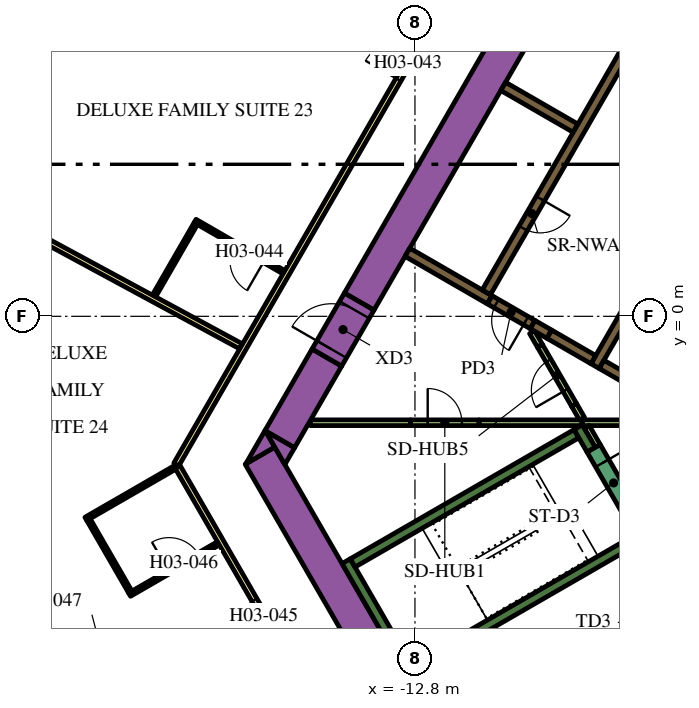
"""IFC4 building model, lengths in metres.
Left out: names, types, materials, properties, quantities, classifications, styles, units other than length and angle.
Written with IfcOpenShell. Run it as: python <this file> out.ifc"""

import sys

from ifc_helpers import new_model, si_unit, direction, frame, frame_2d, origin, place, context, subcontext, project, spatial, polyline, rectangle, outline, extrude, element, fill, save


model = new_model("IFC4")
c1 = context("Model", 3, precision=1e-05, world=origin(), true_north=direction((0.0, 1.0)))
c2 = subcontext(c1, "Body", "Model", "MODEL_VIEW")
j1 = project(units=[si_unit("LENGTHUNIT", "METRE"), si_unit("PLANEANGLEUNIT", "RADIAN")], contexts=[c1])
p1 = place(None, origin())
s1 = spatial("IfcSite", under=j1, at=p1, CompositionType="ELEMENT")
p2 = place(p1, origin())
s2 = spatial("IfcBuilding", under=s1, at=p2, CompositionType="ELEMENT")
p3 = place(p2, frame((0.0, 0.0, 54.9)))
s3 = spatial("IfcBuildingStorey", under=s2, at=p3, CompositionType="ELEMENT", Elevation=54.9)
p4 = place(p3, frame((-14.268, 0.387, 0.0), z_axis=(0.0, 0.0, 1.0), x_axis=(0.499994617707, 0.866028511231, 0.0)))
e1 = element("IfcWall", 1, at=p4, inside=s3, PredefinedType="SOLIDWALL", context=c2, shape_type="SweptSolid", body=[
    extrude(rectangle(XDim=18.817, YDim=0.9, at=frame_2d((9.409, 0.0))), origin(), (0.0, 0.0, 1.0), 3.9),
])
p5 = place(p3, frame((-12.134, -11.883, 0.0), z_axis=(0.0, 0.0, 1.0), x_axis=(-0.500005339912, 0.866022320763, 0.0)))
e2 = element("IfcWall", 2, at=p5, inside=s3, PredefinedType="SOLIDWALL", context=c2, shape_type="SweptSolid", body=[
    extrude(rectangle(XDim=9.488, YDim=0.9, at=frame_2d((4.744, 0.0))), origin(), (0.0, 0.0, 1.0), 3.9),
])
p6 = place(p3, origin())
e3 = element("IfcWall", 3, at=p6, inside=s3, PredefinedType="SOLIDWALL", context=c2, shape_type="SweptSolid", body=[
    extrude(outline(polyline([(-16.489, -3.44), (-17.251, -3.88), (-16.743, -3.0), (-16.489, -3.44)])), origin(), (0.0, 0.0, 1.0), 3.9),
])
p7 = place(p3, frame((-15.118, -1.085, 0.0), z_axis=(0.0, 0.0, 1.0), x_axis=(-0.50006606081, -0.865987260198, 0.0)))
e4 = element("IfcWall", 4, at=p7, inside=s3, PredefinedType="SOLIDWALL", context=c2, shape_type="SweptSolid", body=[
    extrude(rectangle(XDim=2.481, YDim=0.9, at=frame_2d((1.24, 0.0))), origin(), (0.0, 0.0, 1.0), 3.9),
])
e5 = element("IfcWall", 5, at=p6, inside=s3, PredefinedType="SOLIDWALL", context=c2, shape_type="SweptSolid", body=[
    extrude(outline(polyline([(-16.223, -3.9), (-16.732, -3.02), (-15.969, -3.46), (-16.223, -3.9)])), origin(), (0.0, 0.0, 1.0), 3.9),
])
p8 = place(p3, frame((-12.885, -9.431, 0.0), z_axis=(0.0, 0.0, 1.0), x_axis=(-0.500020560727, 0.866013532718, 0.0)))
e6 = element("IfcWall", 6, at=p8, inside=s3, PredefinedType="SOLIDWALL", context=c2, shape_type="SweptSolid", body=[
    extrude(rectangle(XDim=3.45, YDim=0.25, at=frame_2d((1.725, 0.0))), origin(), (0.0, 0.0, 1.0), 3.9),
])
p9 = place(p3, frame((-14.44, -6.49, 0.0), z_axis=(0.0, 0.0, 1.0), x_axis=(0.866022966069, 0.500004222222, 0.0)))
e7 = element("IfcWall", 7, at=p9, inside=s3, PredefinedType="SOLIDWALL", context=c2, shape_type="SweptSolid", body=[
    extrude(rectangle(XDim=6.8, YDim=0.25, at=frame_2d((3.4, 0.0))), origin(), (0.0, 0.0, 1.0), 3.9),
])
p10 = place(p3, frame((-8.163, -3.511, 0.0), z_axis=(0.0, 0.0, 1.0), x_axis=(-0.500206266495, 0.865906283012, 0.0)))
e8 = element("IfcWall", 8, at=p10, inside=s3, PredefinedType="SOLIDWALL", context=c2, shape_type="SweptSolid", body=[
    extrude(rectangle(XDim=0.684, YDim=0.25, at=frame_2d((0.342, 0.0))), origin(), (0.0, 0.0, 1.0), 3.9),
])
p11 = place(p3, frame((-12.84, -9.261, 0.0), z_axis=(0.0, 0.0, 1.0), x_axis=(0.866016039709, 0.500016218704, 0.0)))
e9 = element("IfcWall", 9, at=p11, inside=s3, PredefinedType="SOLIDWALL", context=c2, shape_type="SweptSolid", body=[
    extrude(rectangle(XDim=7.05, YDim=0.25, at=frame_2d((3.525, 0.0))), origin(), (0.0, 0.0, 1.0), 3.9),
])
p12 = place(p3, frame((-8.06, -1.311, 0.0), z_axis=(0.0, 0.0, 1.0), x_axis=(0.50000273126, 0.866023826885, 0.0)))
e10 = element("IfcWall", 10, at=p12, inside=s3, PredefinedType="SOLIDWALL", context=c2, shape_type="SweptSolid", body=[
    extrude(rectangle(XDim=10.33, YDim=0.25, at=frame_2d((5.165, 0.0))), origin(), (0.0, 0.0, 1.0), 3.9),
])
e11 = element("IfcWall", 11, at=p6, inside=s3, PredefinedType="SOLIDWALL", context=c2, shape_type="SweptSolid", body=[
    extrude(outline(polyline([(-5.922, -2.257), (-5.922, -2.257), (-5.705, -2.382), (-5.83, -2.598), (-6.418, -2.258), (-6.433, -2.153), (-6.433, -2.153), (-6.433, -2.153), (-6.508, -2.163), (-6.508, -2.163), (-6.508, -2.163), (-6.501, -2.21), (-7.952, -1.373), (-7.827, -1.156), (-5.922, -2.257)])), origin(), (0.0, 0.0, 1.0), 3.9),
])
p13 = place(p3, frame((-9.708, -0.215, 0.0), z_axis=(0.0, 0.0, 1.0), x_axis=(0.866113839764, -0.499846793097, 0.0)))
e12 = element("IfcWall", 12, at=p13, inside=s3, PredefinedType="SOLIDWALL", context=c2, shape_type="SweptSolid", body=[
    extrude(rectangle(XDim=0.51, YDim=0.25, at=frame_2d((0.255, 0.0))), origin(), (0.0, 0.0, 1.0), 3.9),
])
p14 = place(p3, frame((-12.999, 1.685, 0.0), z_axis=(0.0, 0.0, 1.0), x_axis=(0.865996765544, -0.500049599607, 0.0)))
e13 = element("IfcWall", 13, at=p14, inside=s3, PredefinedType="SOLIDWALL", context=c2, shape_type="SweptSolid", body=[
    extrude(rectangle(XDim=2.498, YDim=0.25, at=frame_2d((1.249, 0.0))), origin(), (0.0, 0.0, 1.0), 3.9),
])
p15 = place(p3, frame((-9.265, -0.471, 0.0), z_axis=(0.0, 0.0, 1.0), x_axis=(0.865954634268, -0.500122556369, 0.0)))
e14 = element("IfcWall", 14, at=p15, inside=s3, PredefinedType="SOLIDWALL", context=c2, shape_type="SweptSolid", body=[
    extrude(rectangle(XDim=1.338, YDim=0.25, at=frame_2d((0.669, 0.0))), origin(), (0.0, 0.0, 1.0), 3.9),
])
p16 = place(p3, frame((-8.574, 4.95, 0.0), z_axis=(0.0, 0.0, 1.0), x_axis=(-0.866008176907, 0.50002983664, 0.0)))
e15 = element("IfcWall", 15, at=p16, inside=s3, PredefinedType="SOLIDWALL", context=c2, shape_type="SweptSolid", body=[
    extrude(rectangle(XDim=2.2, YDim=0.25, at=frame_2d((1.1, 0.0))), origin(), (0.0, 0.0, 1.0), 3.9),
])
p17 = place(p3, frame((-12.915, -2.8, 0.0), z_axis=(0.0, 0.0, 1.0), x_axis=(-1.0, 0.0, 0.0)))
e16 = element("IfcWall", 16, at=p17, inside=s3, PredefinedType="PARTITIONING", context=c2, shape_type="SweptSolid", body=[
    extrude(rectangle(XDim=2.637, YDim=0.15, at=frame_2d((1.318, 0.0))), origin(), (0.0, 0.0, 1.0), 2.75),
])
p18 = place(p3, frame((-8.395, -2.8, 0.0), z_axis=(0.0, 0.0, 1.0), x_axis=(1.0, 0.0, 0.0)))
e17 = element("IfcWall", 17, at=p18, inside=s3, PredefinedType="PARTITIONING", context=c2, shape_type="SweptSolid", body=[
    extrude(rectangle(XDim=1.828, YDim=0.15, at=frame_2d((0.914, 0.0))), origin(), (0.0, 0.0, 1.0), 2.75),
])
p19 = place(p3, frame((-11.115, -2.8, 0.0), z_axis=(0.0, 0.0, 1.0), x_axis=(1.0, 0.0, 0.0)))
e18 = element("IfcWall", 18, at=p19, inside=s3, PredefinedType="PARTITIONING", context=c2, shape_type="SweptSolid", body=[
    extrude(rectangle(XDim=2.708, YDim=0.15, at=frame_2d((1.354, 0.0))), origin(), (0.0, 0.0, 1.0), 2.75),
])
p20 = place(p3, frame((-7.99, -3.412, 0.0), z_axis=(0.0, 0.0, 1.0), x_axis=(-0.500193841991, 0.86591346013, 0.0)))
e19 = element("IfcWall", 19, at=p20, inside=s3, PredefinedType="PARTITIONING", context=c2, shape_type="SweptSolid", body=[
    extrude(rectangle(XDim=0.583, YDim=0.15, at=frame_2d((0.292, 0.0))), origin(), (0.0, 0.0, 1.0), 2.75),
])
p21 = place(p3, frame((-8.612, -2.333, 0.0), z_axis=(0.0, 0.0, 1.0), x_axis=(0.500248216681, -0.86588204838, 0.0)))
e20 = element("IfcWall", 20, at=p21, inside=s3, PredefinedType="PARTITIONING", context=c2, shape_type="SweptSolid", body=[
    extrude(rectangle(XDim=0.415, YDim=0.15, at=frame_2d((0.208, 0.0))), origin(), (0.0, 0.0, 1.0), 2.75),
])
p22 = place(p3, frame((-9.512, -0.775, 0.0), z_axis=(0.0, 0.0, 1.0), x_axis=(-0.500080620599, 0.865978852456, 0.0)))
e21 = element("IfcWall", 21, at=p22, inside=s3, PredefinedType="PARTITIONING", context=c2, shape_type="SweptSolid", body=[
    extrude(rectangle(XDim=0.413, YDim=0.15, at=frame_2d((0.207, 0.0))), origin(), (0.0, 0.0, 1.0), 2.75),
])
p23 = place(p3, frame((-6.008, 9.144, 0.0), z_axis=(0.0, 0.0, 1.0), x_axis=(-0.500006956611, -0.866021387346, 0.0)))
e22 = element("IfcWall", 22, at=p23, inside=s3, PredefinedType="SOLIDWALL", context=c2, shape_type="SweptSolid", body=[
    extrude(rectangle(XDim=9.83, YDim=0.25, at=frame_2d((4.915, 0.0))), origin(), (0.0, 0.0, 1.0), 3.9),
])
p24 = place(p23, frame((6.985, 0.0, 0.0)))
e23 = element("IfcOpeningElement", 23, at=p24, cuts=e22, PredefinedType="OPENING", context=c2, shape_type="SweptSolid", body=[
    extrude(rectangle(XDim=0.9, YDim=2.1, at=frame_2d((0.45, 1.05))), frame((0.0, 0.135, 0.0), z_axis=(0.0, -1.0, 0.0), x_axis=(1.0, 0.0, 0.0)), (0.0, 0.0, 1.0), 0.27),
])
p25 = place(p3, frame((-8.098, -3.474, 0.0), z_axis=(0.0, 0.0, 1.0), x_axis=(0.49994051562, -0.866059744384, 0.0)))
e24 = element("IfcWall", 24, at=p25, inside=s3, PredefinedType="SOLIDWALL", context=c2, shape_type="SweptSolid", body=[
    extrude(rectangle(XDim=2.1, YDim=0.4, at=frame_2d((1.05, 0.0))), origin(), (0.0, 0.0, 1.0), 3.9),
])
p26 = place(p25, frame((0.45, 0.0, 0.0)))
e25 = element("IfcOpeningElement", 25, at=p26, cuts=e24, PredefinedType="OPENING", context=c2, shape_type="SweptSolid", body=[
    extrude(rectangle(XDim=1.2, YDim=2.1, at=frame_2d((0.6, 1.05))), frame((0.0, 0.21, 0.0), z_axis=(0.0, -1.0, 0.0), x_axis=(1.0, 0.0, 0.0)), (0.0, 0.0, 1.0), 0.42),
])
p27 = place(p3, frame((-9.708, -0.215, 0.0), z_axis=(0.0, 0.0, 1.0), x_axis=(-0.866004217611, 0.500036693733, 0.0)))
e26 = element("IfcWall", 26, at=p27, inside=s3, PredefinedType="SOLIDWALL", context=c2, shape_type="SweptSolid", body=[
    extrude(rectangle(XDim=1.3, YDim=0.25, at=frame_2d((0.65, 0.0))), origin(), (0.0, 0.0, 1.0), 3.9),
])
p28 = place(p27, frame((0.2, 0.0, 0.0)))
e27 = element("IfcOpeningElement", 27, at=p28, cuts=e26, PredefinedType="OPENING", context=c2, shape_type="SweptSolid", body=[
    extrude(rectangle(XDim=0.9, YDim=2.1, at=frame_2d((0.45, 1.05))), frame((0.0, 0.135, 0.0), z_axis=(0.0, -1.0, 0.0), x_axis=(1.0, 0.0, 0.0)), (0.0, 0.0, 1.0), 0.27),
])
p29 = place(p3, frame((-15.118, -1.085, 0.0), z_axis=(0.0, 0.0, 1.0), x_axis=(0.500000056704, 0.866025371046, 0.0)))
e28 = element("IfcWall", 28, at=p29, inside=s3, PredefinedType="SOLIDWALL", context=c2, shape_type="SweptSolid", body=[
    extrude(rectangle(XDim=1.7, YDim=0.9, at=frame_2d((0.85, 0.0))), origin(), (0.0, 0.0, 1.0), 3.9),
])
p30 = place(p29, frame((0.25, 0.0, 0.0)))
e29 = element("IfcOpeningElement", 29, at=p30, cuts=e28, PredefinedType="OPENING", context=c2, shape_type="SweptSolid", body=[
    extrude(rectangle(XDim=1.2, YDim=2.1, at=frame_2d((0.6, 1.05))), frame((0.0, 0.46, 0.0), z_axis=(0.0, -1.0, 0.0), x_axis=(1.0, 0.0, 0.0)), (0.0, 0.0, 1.0), 0.92),
])
p31 = place(p3, frame((-12.915, -2.8, 0.0), z_axis=(0.0, 0.0, 1.0), x_axis=(1.0, 0.0, 0.0)))
e30 = element("IfcWall", 30, at=p31, inside=s3, PredefinedType="PARTITIONING", context=c2, shape_type="SweptSolid", body=[
    extrude(rectangle(XDim=1.8, YDim=0.15, at=frame_2d((0.9, 0.0))), origin(), (0.0, 0.0, 1.0), 2.75),
])
p32 = place(p31, frame((0.45, 0.0, 0.0)))
e31 = element("IfcOpeningElement", 31, at=p32, cuts=e30, PredefinedType="OPENING", context=c2, shape_type="SweptSolid", body=[
    extrude(rectangle(XDim=0.9, YDim=2.1, at=frame_2d((0.45, 1.05))), frame((0.0, 0.085, 0.0), z_axis=(0.0, -1.0, 0.0), x_axis=(1.0, 0.0, 0.0)), (0.0, 0.0, 1.0), 0.17),
])
p33 = place(p3, frame((-8.612, -2.333, 0.0), z_axis=(0.0, 0.0, 1.0), x_axis=(-0.499961193289, 0.866047807691, 0.0)))
e32 = element("IfcWall", 32, at=p33, inside=s3, PredefinedType="PARTITIONING", context=c2, shape_type="SweptSolid", body=[
    extrude(rectangle(XDim=1.8, YDim=0.15, at=frame_2d((0.9, 0.0))), origin(), (0.0, 0.0, 1.0), 2.75),
])
p34 = place(p33, frame((0.45, 0.0, 0.0)))
e33 = element("IfcOpeningElement", 33, at=p34, cuts=e32, PredefinedType="OPENING", context=c2, shape_type="SweptSolid", body=[
    extrude(rectangle(XDim=0.9, YDim=2.1, at=frame_2d((0.45, 1.05))), frame((0.0, 0.085, 0.0), z_axis=(0.0, -1.0, 0.0), x_axis=(1.0, 0.0, 0.0)), (0.0, 0.0, 1.0), 0.17),
])
p35 = place(p3, frame((-19.081, -3.9, 0.0), z_axis=(0.0, 0.0, 1.0), x_axis=(0.499998313975, 0.866026377209, 0.0)))
e34 = element("IfcWall", 34, at=p35, inside=s3, PredefinedType="PARTITIONING", context=c2, shape_type="SweptSolid", body=[
    extrude(rectangle(XDim=25.766, YDim=0.15, at=frame_2d((12.883, 0.0))), origin(), (0.0, 0.0, 1.0), 2.75),
])
p36 = place(p35, frame((22.445, 0.0, 0.0)))
e35 = element("IfcOpeningElement", 35, at=p36, cuts=e34, PredefinedType="OPENING", context=c2, shape_type="SweptSolid", body=[
    extrude(rectangle(XDim=1.0, YDim=2.1, at=frame_2d((0.5, 1.05))), frame((0.0, 0.085, 0.0), z_axis=(0.0, -1.0, 0.0), x_axis=(1.0, 0.0, 0.0)), (0.0, 0.0, 1.0), 0.17),
])
p37 = place(p35, frame((21.138, 0.0, 0.0)))
e36 = element("IfcOpeningElement", 36, at=p37, cuts=e34, PredefinedType="OPENING", context=c2, shape_type="SweptSolid", body=[
    extrude(rectangle(XDim=1.0, YDim=2.1, at=frame_2d((0.5, 1.05))), frame((0.0, 0.085, 0.0), z_axis=(0.0, -1.0, 0.0), x_axis=(1.0, 0.0, 0.0)), (0.0, 0.0, 1.0), 0.17),
])
p38 = place(p35, frame((14.066, 0.0, 0.0)))
e37 = element("IfcOpeningElement", 37, at=p38, cuts=e34, PredefinedType="OPENING", context=c2, shape_type="SweptSolid", body=[
    extrude(rectangle(XDim=0.9, YDim=2.1, at=frame_2d((0.45, 1.05))), frame((0.0, 0.085, 0.0), z_axis=(0.0, -1.0, 0.0), x_axis=(1.0, 0.0, 0.0)), (0.0, 0.0, 1.0), 0.17),
])
p39 = place(p35, frame((11.693, 0.0, 0.0)))
e38 = element("IfcOpeningElement", 38, at=p39, cuts=e34, PredefinedType="OPENING", context=c2, shape_type="SweptSolid", body=[
    extrude(rectangle(XDim=1.0, YDim=2.1, at=frame_2d((0.5, 1.05))), frame((0.0, 0.085, 0.0), z_axis=(0.0, -1.0, 0.0), x_axis=(1.0, 0.0, 0.0)), (0.0, 0.0, 1.0), 0.17),
])
p40 = place(p3, frame((-16.412, -8.523, 0.0), z_axis=(0.0, 0.0, 1.0), x_axis=(-0.500001929737, 0.866024289647, 0.0)))
e39 = element("IfcWall", 39, at=p40, inside=s3, PredefinedType="PARTITIONING", context=c2, shape_type="SweptSolid", body=[
    extrude(rectangle(XDim=5.268, YDim=0.15, at=frame_2d((2.634, 0.0))), origin(), (0.0, 0.0, 1.0), 2.75),
])
p41 = place(p40, frame((0.226, 0.0, 0.0)))
e40 = element("IfcOpeningElement", 40, at=p41, cuts=e39, PredefinedType="OPENING", context=c2, shape_type="SweptSolid", body=[
    extrude(rectangle(XDim=1.0, YDim=2.1, at=frame_2d((0.5, 1.05))), frame((0.0, 0.085, 0.0), z_axis=(0.0, -1.0, 0.0), x_axis=(1.0, 0.0, 0.0)), (0.0, 0.0, 1.0), 0.17),
])
p42 = place(p3, frame((-29.12, -5.356, 0.0), z_axis=(0.0, 0.0, 1.0), x_axis=(0.892401965553, -0.451241323327, 0.0)))
e41 = element("IfcWall", 41, at=p42, inside=s3, PredefinedType="PARTITIONING", context=c2, shape_type="SweptSolid", body=[
    extrude(rectangle(XDim=10.729, YDim=0.15, at=frame_2d((5.364, 0.0))), origin(), (0.0, 0.0, 1.0), 2.75),
])
p43 = place(p3, frame((-24.145, 2.871, 0.0), z_axis=(0.0, 0.0, 1.0), x_axis=(0.879551725039, -0.475803281809, 0.0)))
e42 = element("IfcWall", 42, at=p43, inside=s3, PredefinedType="PARTITIONING", context=c2, shape_type="SweptSolid", body=[
    extrude(rectangle(XDim=7.688, YDim=0.15, at=frame_2d((3.844, 0.0))), origin(), (0.0, 0.0, 1.0), 2.75),
])
p44 = place(p3, frame((-16.247, 1.159, 0.0), z_axis=(0.0, 0.0, 1.0), x_axis=(-0.866059108428, 0.4999416173, 0.0)))
e43 = element("IfcWall", 43, at=p44, inside=s3, PredefinedType="PARTITIONING", context=c2, shape_type="SweptSolid", body=[
    extrude(rectangle(XDim=2.7, YDim=0.1, at=frame_2d((1.35, 0.0))), origin(), (0.0, 0.0, 1.0), 2.75),
])
p45 = place(p44, frame((0.6, 0.0, 0.0)))
e44 = element("IfcOpeningElement", 44, at=p45, cuts=e43, PredefinedType="OPENING", context=c2, shape_type="SweptSolid", body=[
    extrude(rectangle(XDim=0.9, YDim=2.1, at=frame_2d((0.45, 1.05))), frame((0.0, 0.06, 0.0), z_axis=(0.0, -1.0, 0.0), x_axis=(1.0, 0.0, 0.0)), (0.0, 0.0, 1.0), 0.12),
])
p46 = place(p3, frame((-18.567, 2.441, 0.0), z_axis=(0.0, 0.0, 1.0), x_axis=(-0.499946605688, -0.86605622881, 0.0)))
e45 = element("IfcWall", 45, at=p46, inside=s3, PredefinedType="PARTITIONING", context=c2, shape_type="SweptSolid", body=[
    extrude(rectangle(XDim=2.2, YDim=0.1, at=frame_2d((1.1, 0.0))), origin(), (0.0, 0.0, 1.0), 2.75),
])
p47 = place(p3, frame((-20.31, -7.323, 0.0), z_axis=(0.0, 0.0, 1.0), x_axis=(0.86599734893, 0.500048589285, 0.0)))
e46 = element("IfcWall", 46, at=p47, inside=s3, PredefinedType="PARTITIONING", context=c2, shape_type="SweptSolid", body=[
    extrude(rectangle(XDim=2.7, YDim=0.1, at=frame_2d((1.35, 0.0))), origin(), (0.0, 0.0, 1.0), 2.75),
])
p48 = place(p47, frame((1.2, 0.0, 0.0)))
e47 = element("IfcOpeningElement", 47, at=p48, cuts=e46, PredefinedType="OPENING", context=c2, shape_type="SweptSolid", body=[
    extrude(rectangle(XDim=0.9, YDim=2.1, at=frame_2d((0.45, 1.05))), frame((0.0, 0.06, 0.0), z_axis=(0.0, -1.0, 0.0), x_axis=(1.0, 0.0, 0.0)), (0.0, 0.0, 1.0), 0.12),
])
p49 = place(p3, frame((-20.291, -7.254, 0.0), z_axis=(0.0, 0.0, 1.0), x_axis=(-0.50002983664, 0.866008176907, 0.0)))
e48 = element("IfcWall", 48, at=p49, inside=s3, PredefinedType="PARTITIONING", context=c2, shape_type="SweptSolid", body=[
    extrude(rectangle(XDim=2.2, YDim=0.1, at=frame_2d((1.1, 0.0))), origin(), (0.0, 0.0, 1.0), 2.75),
])
p50 = place(p3, frame((-19.121, -3.981, 0.0), z_axis=(0.0, 0.0, 1.0), x_axis=(-0.866019956843, -0.50000943426, 0.0)))
e49 = element("IfcWall", 49, at=p50, inside=s3, PredefinedType="PARTITIONING", context=c2, shape_type="SweptSolid", body=[
    extrude(rectangle(XDim=2.7, YDim=0.1, at=frame_2d((1.35, 0.0))), origin(), (0.0, 0.0, 1.0), 2.75),
])
p51 = place(p3, frame((-22.05, 8.22, 0.0), z_axis=(0.0, 0.0, 1.0), x_axis=(-0.483912572871, -0.875116347589, 0.0)))
e50 = element("IfcWall", 50, at=p51, inside=s3, PredefinedType="SOLIDWALL", context=c2, shape_type="SweptSolid", body=[
    extrude(rectangle(XDim=4.998, YDim=0.29, at=frame_2d((2.499, 0.0))), origin(), (0.0, 0.0, 1.0), 3.65),
])
p52 = place(p51, frame((0.297, 0.0, 0.9)))
e51 = element("IfcOpeningElement", 51, at=p52, cuts=e50, PredefinedType="OPENING", context=c2, shape_type="SweptSolid", body=[
    extrude(rectangle(XDim=1.2, YDim=2.15, at=frame_2d((0.6, 1.075))), frame((0.0, 0.155, 0.0), z_axis=(0.0, -1.0, 0.0), x_axis=(1.0, 0.0, 0.0)), (0.0, 0.0, 1.0), 0.31),
])
p53 = place(p51, frame((3.501, 0.0, 0.9)))
e52 = element("IfcOpeningElement", 52, at=p53, cuts=e50, PredefinedType="OPENING", context=c2, shape_type="SweptSolid", body=[
    extrude(rectangle(XDim=1.2, YDim=2.15, at=frame_2d((0.6, 1.075))), frame((0.0, 0.155, 0.0), z_axis=(0.0, -1.0, 0.0), x_axis=(1.0, 0.0, 0.0)), (0.0, 0.0, 1.0), 0.31),
])
p54 = place(p24, origin())
e53 = element("IfcDoor", 53, at=p54, inside=s3, OperationType="SINGLE_SWING_LEFT", PredefinedType="DOOR", context=c2, shape_type="SweptSolid", body=[
    extrude(rectangle(XDim=0.9, YDim=2.1, at=frame_2d((0.45, 1.05))), frame((0.0, 0.025, 0.0), z_axis=(0.0, -1.0, 0.0), x_axis=(1.0, 0.0, 0.0)), (0.0, 0.0, 1.0), 0.05),
])
fill(e23, e53)
p55 = place(p26, origin())
e54 = element("IfcDoor", 54, at=p55, inside=s3, OperationType="SINGLE_SWING_LEFT", PredefinedType="DOOR", context=c2, shape_type="SweptSolid", body=[
    extrude(rectangle(XDim=1.2, YDim=2.1, at=frame_2d((0.6, 1.05))), frame((0.0, 0.025, 0.0), z_axis=(0.0, -1.0, 0.0), x_axis=(1.0, 0.0, 0.0)), (0.0, 0.0, 1.0), 0.05),
])
fill(e25, e54)
p56 = place(p28, origin())
e55 = element("IfcDoor", 55, at=p56, inside=s3, OperationType="SINGLE_SWING_LEFT", PredefinedType="DOOR", context=c2, shape_type="SweptSolid", body=[
    extrude(rectangle(XDim=0.9, YDim=2.1, at=frame_2d((0.45, 1.05))), frame((0.0, 0.025, 0.0), z_axis=(0.0, -1.0, 0.0), x_axis=(1.0, 0.0, 0.0)), (0.0, 0.0, 1.0), 0.05),
])
fill(e27, e55)
p57 = place(p30, origin())
e56 = element("IfcDoor", 56, at=p57, inside=s3, OperationType="SINGLE_SWING_LEFT", PredefinedType="DOOR", context=c2, shape_type="SweptSolid", body=[
    extrude(rectangle(XDim=1.2, YDim=2.1, at=frame_2d((0.6, 1.05))), frame((0.0, 0.025, 0.0), z_axis=(0.0, -1.0, 0.0), x_axis=(1.0, 0.0, 0.0)), (0.0, 0.0, 1.0), 0.05),
])
fill(e29, e56)
p58 = place(p32, origin())
e57 = element("IfcDoor", 57, at=p58, inside=s3, OperationType="SINGLE_SWING_LEFT", PredefinedType="DOOR", context=c2, shape_type="SweptSolid", body=[
    extrude(rectangle(XDim=0.9, YDim=2.1, at=frame_2d((0.45, 1.05))), frame((0.0, 0.025, 0.0), z_axis=(0.0, -1.0, 0.0), x_axis=(1.0, 0.0, 0.0)), (0.0, 0.0, 1.0), 0.05),
])
fill(e31, e57)
p59 = place(p34, origin())
e58 = element("IfcDoor", 58, at=p59, inside=s3, OperationType="SINGLE_SWING_LEFT", PredefinedType="DOOR", context=c2, shape_type="SweptSolid", body=[
    extrude(rectangle(XDim=0.9, YDim=2.1, at=frame_2d((0.45, 1.05))), frame((0.0, 0.025, 0.0), z_axis=(0.0, -1.0, 0.0), x_axis=(1.0, 0.0, 0.0)), (0.0, 0.0, 1.0), 0.05),
])
fill(e33, e58)
p60 = place(p39, origin())
e59 = element("IfcDoor", 59, at=p60, inside=s3, OperationType="SINGLE_SWING_RIGHT", PredefinedType="DOOR", context=c2, shape_type="SweptSolid", body=[
    extrude(rectangle(XDim=1.0, YDim=2.1, at=frame_2d((0.5, 1.05))), frame((0.0, 0.025, 0.0), z_axis=(0.0, -1.0, 0.0), x_axis=(1.0, 0.0, 0.0)), (0.0, 0.0, 1.0), 0.05),
])
fill(e38, e59)
p61 = place(p45, origin())
e60 = element("IfcDoor", 60, at=p61, inside=s3, OperationType="SINGLE_SWING_LEFT", PredefinedType="DOOR", context=c2, shape_type="SweptSolid", body=[
    extrude(rectangle(XDim=0.9, YDim=2.1, at=frame_2d((0.45, 1.05))), frame((0.0, 0.025, 0.0), z_axis=(0.0, -1.0, 0.0), x_axis=(1.0, 0.0, 0.0)), (0.0, 0.0, 1.0), 0.05),
])
fill(e44, e60)
p62 = place(p41, origin())
e61 = element("IfcDoor", 61, at=p62, inside=s3, OperationType="SINGLE_SWING_LEFT", PredefinedType="DOOR", context=c2, shape_type="SweptSolid", body=[
    extrude(rectangle(XDim=1.0, YDim=2.1, at=frame_2d((0.5, 1.05))), frame((0.0, 0.025, 0.0), z_axis=(0.0, -1.0, 0.0), x_axis=(1.0, 0.0, 0.0)), (0.0, 0.0, 1.0), 0.05),
])
fill(e40, e61)
p63 = place(p48, origin())
e62 = element("IfcDoor", 62, at=p63, inside=s3, OperationType="SINGLE_SWING_RIGHT", PredefinedType="DOOR", context=c2, shape_type="SweptSolid", body=[
    extrude(rectangle(XDim=0.9, YDim=2.1, at=frame_2d((0.45, 1.05))), frame((0.0, 0.025, 0.0), z_axis=(0.0, -1.0, 0.0), x_axis=(1.0, 0.0, 0.0)), (0.0, 0.0, 1.0), 0.05),
])
fill(e47, e62)
p64 = place(p52, origin())
e63 = element("IfcWindow", 63, at=p64, inside=s3, PartitioningType="DOUBLE_PANEL_VERTICAL", PredefinedType="WINDOW", context=c2, shape_type="SweptSolid", body=[
    extrude(rectangle(XDim=1.2, YDim=2.15, at=frame_2d((0.6, 1.075))), frame((0.0, 0.015, 0.0), z_axis=(0.0, -1.0, 0.0), x_axis=(1.0, 0.0, 0.0)), (0.0, 0.0, 1.0), 0.06),
])
fill(e51, e63)
save(model, sys.argv[1])
